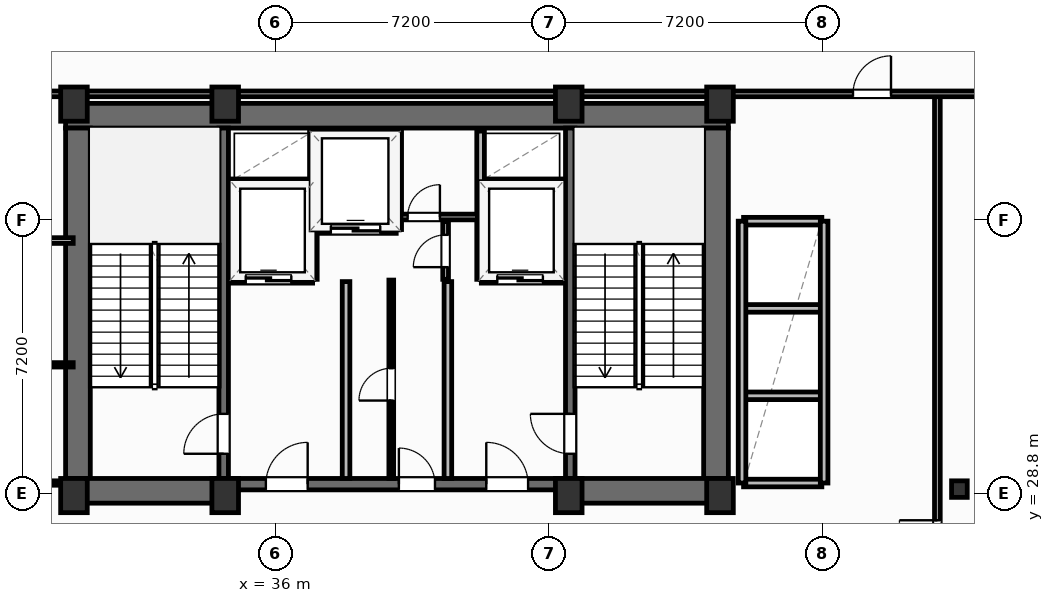
"""IFC4 building model, lengths in metres.
Left out: names, types, materials, properties, quantities, classifications, styles, units other than length and angle.
Written with IfcOpenShell. Run it as: python <this file> out.ifc"""

import sys

from ifc_helpers import new_model, si_unit, direction, frame, frame_2d, origin, origin_2d, place, context, subcontext, project, spatial, rectangle, i_section, extrude, element, fill, save


model = new_model("IFC4")
c1 = context("Model", 3, precision=1e-05, world=origin(), true_north=direction((0.0, 1.0)))
c2 = subcontext(c1, "Body", "Model", "MODEL_VIEW")
j1 = project(units=[si_unit("LENGTHUNIT", "METRE"), si_unit("PLANEANGLEUNIT", "RADIAN")], contexts=[c1])
p1 = place(None, origin())
s1 = spatial("IfcSite", under=j1, at=p1, CompositionType="ELEMENT")
p2 = place(p1, origin())
s2 = spatial("IfcBuilding", under=s1, at=p2, CompositionType="ELEMENT")
p3 = place(p2, frame((0.0, 0.0, 207.9)))
s3 = spatial("IfcBuildingStorey", under=s2, at=p3, CompositionType="ELEMENT", Elevation=207.9)
for number, where, z_axis, x_axis in (
    (1, (30.7, 28.75, 0.0), (0.0, 0.0, 1.0), (1.0, 0.0, 0.0)),
    (2, (34.68, 28.75, 0.0), (0.0, 0.0, 1.0), (1.0, 0.0, 0.0)),
    (3, (43.72, 28.75, 0.0), (0.0, 0.0, 1.0), (1.0, 0.0, 0.0)),
    (4, (47.7, 28.75, 0.0), (0.0, 0.0, 1.0), (1.0, 0.0, 0.0)),
    (5, (30.7, 39.05, 0.0), (0.0, 0.0, 1.0), (1.0, 0.0, 0.0)),
    (6, (34.68, 39.05, 0.0), (0.0, 0.0, 1.0), (1.0, 0.0, 0.0)),
    (7, (43.72, 39.05, 0.0), (0.0, 0.0, 1.0), (1.0, 0.0, 0.0)),
    (8, (47.7, 39.05, 0.0), (0.0, 0.0, 1.0), (1.0, 0.0, 0.0)),
):
    element("IfcColumn", number, at=place(p3, frame(where, z_axis=z_axis, x_axis=x_axis)), inside=s3, PredefinedType="COLUMN", context=c2, shape_type="SweptSolid", body=[
        extrude(rectangle(XDim=0.7, YDim=0.9, at=origin_2d()), origin(), (0.0, 0.0, 1.0), 4.8),
    ])
p4 = place(p3, frame((54.0, 28.92, 0.0), z_axis=(0.0, 0.0, 1.0), x_axis=(1.0, 0.0, 0.0)))
e9 = element("IfcColumn", 9, at=p4, inside=s3, PredefinedType="COLUMN", context=c2, shape_type="SweptSolid", body=[
    extrude(i_section(OverallWidth=0.412, OverallDepth=0.435, WebThickness=0.036, FlangeThickness=0.057, FilletRadius=0.025, at=origin_2d()), origin(), (0.0, 0.0, 1.0), 4.8),
])
p5 = place(p3, frame((30.48, 38.745, 0.0), z_axis=(0.0, 0.0, 1.0), x_axis=(1.0, 0.0, 0.0)))
e10 = element("IfcWall", 10, at=p5, inside=s3, PredefinedType="SHEAR", context=c2, shape_type="SweptSolid", body=[
    extrude(rectangle(XDim=17.44, YDim=0.65, at=frame_2d((8.72, 0.0))), origin(), (0.0, 0.0, 1.0), 4.55),
])
for number, where, z_axis, x_axis in (
    (11, (30.805, 29.2, 0.0), (0.0, 0.0, 1.0), (0.0, 1.0, 0.0)),
    (12, (47.595, 29.2, 0.0), (0.0, 0.0, 1.0), (0.0, 1.0, 0.0)),
):
    element("IfcWall", number, at=place(p3, frame(where, z_axis=z_axis, x_axis=x_axis)), inside=s3, PredefinedType="SHEAR", context=c2, shape_type="SweptSolid", body=[
        extrude(rectangle(XDim=9.22, YDim=0.65, at=frame_2d((4.61, 0.0))), origin(), (0.0, 0.0, 1.0), 4.55),
    ])
p6 = place(p3, frame((30.48, 28.875, 0.0), z_axis=(0.0, 0.0, 1.0), x_axis=(1.0, 0.0, 0.0)))
e13 = element("IfcWall", 13, at=p6, inside=s3, PredefinedType="SHEAR", context=c2, shape_type="SweptSolid", body=[
    extrude(rectangle(XDim=4.32, YDim=0.65, at=frame_2d((2.16, 0.0))), origin(), (0.0, 0.0, 1.0), 4.55),
])
p7 = place(p3, frame((43.6, 28.875, 0.0), z_axis=(0.0, 0.0, 1.0), x_axis=(1.0, 0.0, 0.0)))
e14 = element("IfcWall", 14, at=p7, inside=s3, PredefinedType="SHEAR", context=c2, shape_type="SweptSolid", body=[
    extrude(rectangle(XDim=4.32, YDim=0.65, at=frame_2d((2.16, 0.0))), origin(), (0.0, 0.0, 1.0), 4.55),
])
p8 = place(p3, frame((34.8, 29.05, 0.0), z_axis=(0.0, 0.0, 1.0), x_axis=(1.0, 0.0, 0.0)))
e15 = element("IfcWall", 15, at=p8, inside=s3, PredefinedType="SHEAR", context=c2, shape_type="SweptSolid", body=[
    extrude(rectangle(XDim=8.8, YDim=0.3, at=frame_2d((4.4, 0.0))), origin(), (0.0, 0.0, 1.0), 4.55),
])
p9 = place(p8, frame((0.95, 0.0, 0.0)))
e16 = element("IfcOpeningElement", 16, at=p9, cuts=e15, PredefinedType="OPENING", context=c2, shape_type="SweptSolid", body=[
    extrude(rectangle(XDim=1.1, YDim=2.15, at=frame_2d((0.55, 1.075))), frame((0.0, 0.16, 0.0), z_axis=(0.0, -1.0, 0.0), x_axis=(1.0, 0.0, 0.0)), (0.0, 0.0, 1.0), 0.32),
])
p10 = place(p8, frame((6.75, 0.0, 0.0)))
e17 = element("IfcOpeningElement", 17, at=p10, cuts=e15, PredefinedType="OPENING", context=c2, shape_type="SweptSolid", body=[
    extrude(rectangle(XDim=1.1, YDim=2.15, at=frame_2d((0.55, 1.075))), frame((0.0, 0.16, 0.0), z_axis=(0.0, -1.0, 0.0), x_axis=(1.0, 0.0, 0.0)), (0.0, 0.0, 1.0), 0.32),
])
p11 = place(p8, frame((4.45, 0.0, 0.0)))
e18 = element("IfcOpeningElement", 18, at=p11, cuts=e15, PredefinedType="OPENING", context=c2, shape_type="SweptSolid", body=[
    extrude(rectangle(XDim=0.95, YDim=2.15, at=frame_2d((0.475, 1.075))), frame((0.0, 0.16, 0.0), z_axis=(0.0, -1.0, 0.0), x_axis=(1.0, 0.0, 0.0)), (0.0, 0.0, 1.0), 0.32),
])
p12 = place(p3, frame((34.64, 29.2, 0.0), z_axis=(0.0, 0.0, 1.0), x_axis=(0.0, 1.0, 0.0)))
e19 = element("IfcWall", 19, at=p12, inside=s3, PredefinedType="SHEAR", context=c2, shape_type="SweptSolid", body=[
    extrude(rectangle(XDim=9.22, YDim=0.25, at=frame_2d((4.61, 0.0))), origin(), (0.0, 0.0, 1.0), 4.55),
])
p13 = place(p12, frame((0.65, 0.0, 0.0)))
e20 = element("IfcOpeningElement", 20, at=p13, cuts=e19, PredefinedType="OPENING", context=c2, shape_type="SweptSolid", body=[
    extrude(rectangle(XDim=1.05, YDim=2.15, at=frame_2d((0.525, 1.075))), frame((0.0, 0.135, 0.0), z_axis=(0.0, -1.0, 0.0), x_axis=(1.0, 0.0, 0.0)), (0.0, 0.0, 1.0), 0.27),
])
p14 = place(p3, frame((43.76, 29.2, 0.0), z_axis=(0.0, 0.0, 1.0), x_axis=(0.0, 1.0, 0.0)))
e21 = element("IfcWall", 21, at=p14, inside=s3, PredefinedType="SHEAR", context=c2, shape_type="SweptSolid", body=[
    extrude(rectangle(XDim=9.22, YDim=0.25, at=frame_2d((4.61, 0.0))), origin(), (0.0, 0.0, 1.0), 4.55),
])
p15 = place(p14, frame((0.65, 0.0, 0.0)))
e22 = element("IfcOpeningElement", 22, at=p15, cuts=e21, PredefinedType="OPENING", context=c2, shape_type="SweptSolid", body=[
    extrude(rectangle(XDim=1.05, YDim=2.15, at=frame_2d((0.525, 1.075))), frame((0.0, 0.135, 0.0), z_axis=(0.0, -1.0, 0.0), x_axis=(1.0, 0.0, 0.0)), (0.0, 0.0, 1.0), 0.27),
])
p16 = place(p3, frame((8.315, 33.164, 0.0), z_axis=(0.0, 0.0, 1.0), x_axis=(0.935222646765, 0.354060165759, 0.0)))
e23 = element("IfcWall", 23, at=p16, inside=s3, PredefinedType="SOLIDWALL", context=c2, shape_type="SweptSolid", body=[
    extrude(rectangle(XDim=52.2, YDim=0.22, at=frame_2d((26.1, 0.0))), origin(), (0.0, 0.0, 1.0), 3.83),
])
p17 = place(p16, frame((23.64, 0.0, 0.0)))
e24 = element("IfcOpeningElement", 24, at=p17, cuts=e23, PredefinedType="OPENING", context=c2, shape_type="SweptSolid", body=[
    extrude(rectangle(XDim=1.85, YDim=2.3, at=frame_2d((0.925, 1.15))), frame((0.0, 0.12, 0.0), z_axis=(0.0, -1.0, 0.0), x_axis=(1.0, 0.0, 0.0)), (0.0, 0.0, 1.0), 0.24),
])
p18 = place(p16, frame((0.55, 0.0, 0.75)))
e25 = element("IfcOpeningElement", 25, at=p18, cuts=e23, PredefinedType="OPENING", context=c2, shape_type="SweptSolid", body=[
    extrude(rectangle(XDim=1.85, YDim=1.75, at=frame_2d((0.925, 0.875))), frame((0.0, 0.12, 0.0), z_axis=(0.0, -1.0, 0.0), x_axis=(1.0, 0.0, 0.0)), (0.0, 0.0, 1.0), 0.24),
])
p19 = place(p16, frame((49.8, 0.0, 0.75)))
e26 = element("IfcOpeningElement", 26, at=p19, cuts=e23, PredefinedType="OPENING", context=c2, shape_type="SweptSolid", body=[
    extrude(rectangle(XDim=1.85, YDim=1.75, at=frame_2d((0.925, 0.875))), frame((0.0, 0.12, 0.0), z_axis=(0.0, -1.0, 0.0), x_axis=(1.0, 0.0, 0.0)), (0.0, 0.0, 1.0), 0.24),
])
p20 = place(p3, frame((53.42, 19.3, 0.0), z_axis=(0.0, 0.0, 1.0), x_axis=(0.0, 1.0, 0.0)))
e27 = element("IfcWall", 27, at=p20, inside=s3, PredefinedType="PARTITIONING", context=c2, shape_type="SweptSolid", body=[
    extrude(rectangle(XDim=20.02, YDim=0.15, at=frame_2d((10.01, 0.0))), origin(), (0.0, 0.0, 1.0), 4.55),
])
p21 = place(p20, frame((7.8, 0.0, 0.0)))
e28 = element("IfcOpeningElement", 28, at=p21, cuts=e27, PredefinedType="OPENING", context=c2, shape_type="SweptSolid", body=[
    extrude(rectangle(XDim=1.0, YDim=2.05, at=frame_2d((0.5, 1.025))), frame((0.0, 0.085, 0.0), z_axis=(0.0, -1.0, 0.0), x_axis=(1.0, 0.0, 0.0)), (0.0, 0.0, 1.0), 0.17),
])
p22 = place(p3, frame((20.0, 39.32, 0.0), z_axis=(0.0, 0.0, 1.0), x_axis=(1.0, 0.0, 0.0)))
e29 = element("IfcWall", 29, at=p22, inside=s3, PredefinedType="PARTITIONING", context=c2, shape_type="SweptSolid", body=[
    extrude(rectangle(XDim=40.0, YDim=0.15, at=frame_2d((20.0, 0.0))), origin(), (0.0, 0.0, 1.0), 4.55),
])
p23 = place(p22, frame((31.2, 0.0, 0.0)))
e30 = element("IfcOpeningElement", 30, at=p23, cuts=e29, PredefinedType="OPENING", context=c2, shape_type="SweptSolid", body=[
    extrude(rectangle(XDim=1.0, YDim=2.05, at=frame_2d((0.5, 1.025))), frame((0.0, 0.085, 0.0), z_axis=(0.0, -1.0, 0.0), x_axis=(1.0, 0.0, 0.0)), (0.0, 0.0, 1.0), 0.17),
])
for number, where, z_axis, x_axis in (
    (31, (37.86, 29.2, 0.0), (0.0, 0.0, 1.0), (0.0, 1.0, 0.0)),
    (32, (40.54, 29.2, 0.0), (0.0, 0.0, 1.0), (0.0, 1.0, 0.0)),
):
    element("IfcWall", number, at=place(p3, frame(where, z_axis=z_axis, x_axis=x_axis)), inside=s3, PredefinedType="PARTITIONING", context=c2, shape_type="SweptSolid", body=[
        extrude(rectangle(XDim=5.18, YDim=0.2, at=frame_2d((2.59, 0.0))), origin(), (0.0, 0.0, 1.0), 4.55),
    ])
p24 = place(p3, frame((34.8, 34.44, 0.0), z_axis=(0.0, 0.0, 1.0), x_axis=(1.0, 0.0, 0.0)))
e33 = element("IfcWall", 33, at=p24, inside=s3, PredefinedType="PARTITIONING", context=c2, shape_type="SweptSolid", body=[
    extrude(rectangle(XDim=2.18, YDim=0.2, at=frame_2d((1.09, 0.0))), origin(), (0.0, 0.0, 1.0), 4.55),
])
p25 = place(p24, frame((0.42, 0.0, 0.0)))
e34 = element("IfcOpeningElement", 34, at=p25, cuts=e33, PredefinedType="OPENING", context=c2, shape_type="SweptSolid", body=[
    extrude(rectangle(XDim=1.2, YDim=2.2, at=frame_2d((0.6, 1.1))), frame((0.0, 0.11, 0.0), z_axis=(0.0, -1.0, 0.0), x_axis=(1.0, 0.0, 0.0)), (0.0, 0.0, 1.0), 0.22),
])
p26 = place(p3, frame((34.8, 36.98, 0.0), z_axis=(0.0, 0.0, 1.0), x_axis=(1.0, 0.0, 0.0)))
e35 = element("IfcWall", 35, at=p26, inside=s3, PredefinedType="PARTITIONING", context=c2, shape_type="SweptSolid", body=[
    extrude(rectangle(XDim=2.18, YDim=0.2, at=frame_2d((1.09, 0.0))), origin(), (0.0, 0.0, 1.0), 4.55),
])
p27 = place(p3, frame((37.0, 34.44, 0.0), z_axis=(0.0, 0.0, 1.0), x_axis=(0.0, 1.0, 0.0)))
e36 = element("IfcWall", 36, at=p27, inside=s3, PredefinedType="PARTITIONING", context=c2, shape_type="SweptSolid", body=[
    extrude(rectangle(XDim=3.9, YDim=0.2, at=frame_2d((1.95, 0.0))), origin(), (0.0, 0.0, 1.0), 4.55),
])
p28 = place(p3, frame((41.42, 34.44, 0.0), z_axis=(0.0, 0.0, 1.0), x_axis=(1.0, 0.0, 0.0)))
e37 = element("IfcWall", 37, at=p28, inside=s3, PredefinedType="PARTITIONING", context=c2, shape_type="SweptSolid", body=[
    extrude(rectangle(XDim=2.18, YDim=0.2, at=frame_2d((1.09, 0.0))), origin(), (0.0, 0.0, 1.0), 4.55),
])
p29 = place(p28, frame((0.42, 0.0, 0.0)))
e38 = element("IfcOpeningElement", 38, at=p29, cuts=e37, PredefinedType="OPENING", context=c2, shape_type="SweptSolid", body=[
    extrude(rectangle(XDim=1.2, YDim=2.2, at=frame_2d((0.6, 1.1))), frame((0.0, 0.11, 0.0), z_axis=(0.0, -1.0, 0.0), x_axis=(1.0, 0.0, 0.0)), (0.0, 0.0, 1.0), 0.22),
])
p30 = place(p3, frame((41.42, 36.98, 0.0), z_axis=(0.0, 0.0, 1.0), x_axis=(1.0, 0.0, 0.0)))
e39 = element("IfcWall", 39, at=p30, inside=s3, PredefinedType="PARTITIONING", context=c2, shape_type="SweptSolid", body=[
    extrude(rectangle(XDim=2.18, YDim=0.2, at=frame_2d((1.09, 0.0))), origin(), (0.0, 0.0, 1.0), 4.55),
])
p31 = place(p3, frame((41.4, 34.44, 0.0), z_axis=(0.0, 0.0, 1.0), x_axis=(0.0, 1.0, 0.0)))
e40 = element("IfcWall", 40, at=p31, inside=s3, PredefinedType="PARTITIONING", context=c2, shape_type="SweptSolid", body=[
    extrude(rectangle(XDim=3.9, YDim=0.2, at=frame_2d((1.95, 0.0))), origin(), (0.0, 0.0, 1.0), 4.55),
])
p32 = place(p3, frame((37.06, 35.75, 0.0), z_axis=(0.0, 0.0, 1.0), x_axis=(1.0, 0.0, 0.0)))
e41 = element("IfcWall", 41, at=p32, inside=s3, PredefinedType="PARTITIONING", context=c2, shape_type="SweptSolid", body=[
    extrude(rectangle(XDim=2.12, YDim=0.2, at=frame_2d((1.06, 0.0))), origin(), (0.0, 0.0, 1.0), 4.55),
])
p33 = place(p32, frame((0.4, 0.0, 0.0)))
e42 = element("IfcOpeningElement", 42, at=p33, cuts=e41, PredefinedType="OPENING", context=c2, shape_type="SweptSolid", body=[
    extrude(rectangle(XDim=1.3, YDim=2.2, at=frame_2d((0.65, 1.1))), frame((0.0, 0.11, 0.0), z_axis=(0.0, -1.0, 0.0), x_axis=(1.0, 0.0, 0.0)), (0.0, 0.0, 1.0), 0.22),
])
p34 = place(p3, frame((39.22, 35.75, 0.0), z_axis=(0.0, 0.0, 1.0), x_axis=(0.0, 1.0, 0.0)))
e43 = element("IfcWall", 43, at=p34, inside=s3, PredefinedType="PARTITIONING", context=c2, shape_type="SweptSolid", body=[
    extrude(rectangle(XDim=2.59, YDim=0.2, at=frame_2d((1.295, 0.0))), origin(), (0.0, 0.0, 1.0), 4.55),
])
p35 = place(p3, frame((39.3, 36.08, 0.0), z_axis=(0.0, 0.0, 1.0), x_axis=(1.0, 0.0, 0.0)))
e44 = element("IfcWall", 44, at=p35, inside=s3, PredefinedType="PARTITIONING", context=c2, shape_type="SweptSolid", body=[
    extrude(rectangle(XDim=2.02, YDim=0.15, at=frame_2d((1.01, 0.0))), origin(), (0.0, 0.0, 1.0), 4.55),
])
p36 = place(p35, frame((0.18, 0.0, 0.0)))
e45 = element("IfcOpeningElement", 45, at=p36, cuts=e44, PredefinedType="OPENING", context=c2, shape_type="SweptSolid", body=[
    extrude(rectangle(XDim=0.85, YDim=2.05, at=frame_2d((0.425, 1.025))), frame((0.0, 0.085, 0.0), z_axis=(0.0, -1.0, 0.0), x_axis=(1.0, 0.0, 0.0)), (0.0, 0.0, 1.0), 0.17),
])
p37 = place(p3, frame((40.48, 34.44, 0.0), z_axis=(0.0, 0.0, 1.0), x_axis=(0.0, 1.0, 0.0)))
e46 = element("IfcWall", 46, at=p37, inside=s3, PredefinedType="PARTITIONING", context=c2, shape_type="SweptSolid", body=[
    extrude(rectangle(XDim=1.52, YDim=0.15, at=frame_2d((0.76, 0.0))), origin(), (0.0, 0.0, 1.0), 4.55),
])
p38 = place(p37, frame((0.32, 0.0, 0.0)))
e47 = element("IfcOpeningElement", 47, at=p38, cuts=e46, PredefinedType="OPENING", context=c2, shape_type="SweptSolid", body=[
    extrude(rectangle(XDim=0.85, YDim=2.05, at=frame_2d((0.425, 1.025))), frame((0.0, 0.085, 0.0), z_axis=(0.0, -1.0, 0.0), x_axis=(1.0, 0.0, 0.0)), (0.0, 0.0, 1.0), 0.17),
])
p39 = place(p3, frame((39.05, 29.2, 0.0), z_axis=(0.0, 0.0, 1.0), x_axis=(0.0, 1.0, 0.0)))
e48 = element("IfcWall", 48, at=p39, inside=s3, PredefinedType="PARTITIONING", context=c2, shape_type="SweptSolid", body=[
    extrude(rectangle(XDim=5.22, YDim=0.125, at=frame_2d((2.61, 0.0))), origin(), (0.0, 0.0, 1.0), 4.55),
])
p40 = place(p39, frame((2.05, 0.0, 0.0)))
e49 = element("IfcOpeningElement", 49, at=p40, cuts=e48, PredefinedType="OPENING", context=c2, shape_type="SweptSolid", body=[
    extrude(rectangle(XDim=0.85, YDim=2.05, at=frame_2d((0.425, 1.025))), frame((0.0, 0.073, 0.0), z_axis=(0.0, -1.0, 0.0), x_axis=(1.0, 0.0, 0.0)), (0.0, 0.0, 1.0), 0.145),
])
p41 = place(p3, frame((26.8, 32.19, 0.0), z_axis=(0.0, 0.0, 1.0), x_axis=(1.0, 0.0, 0.0)))
e50 = element("IfcWall", 50, at=p41, inside=s3, PredefinedType="PARTITIONING", context=c2, shape_type="SweptSolid", body=[
    extrude(rectangle(XDim=3.88, YDim=0.115, at=frame_2d((1.94, 0.0))), origin(), (0.0, 0.0, 1.0), 4.55),
])
p42 = place(p3, frame((26.78, 29.08, 0.0), z_axis=(0.0, 0.0, 1.0), x_axis=(1.0, 0.0, 0.0)))
e51 = element("IfcWall", 51, at=p42, inside=s3, PredefinedType="PARTITIONING", context=c2, shape_type="SweptSolid", body=[
    extrude(rectangle(XDim=3.7, YDim=0.115, at=frame_2d((1.85, 0.0))), origin(), (0.0, 0.0, 1.0), 4.55),
])
p43 = place(p3, frame((26.78, 35.46, 0.0), z_axis=(0.0, 0.0, 1.0), x_axis=(1.0, 0.0, 0.0)))
e52 = element("IfcWall", 52, at=p43, inside=s3, PredefinedType="PARTITIONING", context=c2, shape_type="SweptSolid", body=[
    extrude(rectangle(XDim=3.9, YDim=0.15, at=frame_2d((1.95, 0.0))), origin(), (0.0, 0.0, 1.0), 4.55),
])
for number, where, z_axis, x_axis in (
    (53, (48.32, 31.375, 0.0), (0.0, 0.0, 1.0), (1.0, 0.0, 0.0)),
    (54, (48.32, 33.675, 0.0), (0.0, 0.0, 1.0), (1.0, 0.0, 0.0)),
):
    element("IfcWall", number, at=place(p3, frame(where, z_axis=z_axis, x_axis=x_axis)), inside=s3, PredefinedType="PARTITIONING", context=c2, shape_type="SweptSolid", body=[
        extrude(rectangle(XDim=2.06, YDim=0.2, at=frame_2d((1.03, 0.0))), origin(), (0.0, 0.0, 1.0), 4.55),
    ])
p44 = place(p3, frame((48.32, 29.08, 0.0), z_axis=(0.0, 0.0, 1.0), x_axis=(1.0, 0.0, 0.0)))
e55 = element("IfcWall", 55, at=p44, inside=s3, PredefinedType="PARTITIONING", context=c2, shape_type="SweptSolid", body=[
    extrude(rectangle(XDim=2.06, YDim=0.2, at=frame_2d((1.03, 0.0))), origin(), (0.0, 0.0, 1.0), 3.762),
])
p45 = place(p3, frame((48.32, 35.97, 0.0), z_axis=(0.0, 0.0, 1.0), x_axis=(1.0, 0.0, 0.0)))
e56 = element("IfcWall", 56, at=p45, inside=s3, PredefinedType="PARTITIONING", context=c2, shape_type="SweptSolid", body=[
    extrude(rectangle(XDim=2.06, YDim=0.2, at=frame_2d((1.03, 0.0))), origin(), (0.0, 0.0, 1.0), 4.55),
])
for number, where, z_axis, x_axis in (
    (57, (48.28, 29.08, 0.0), (0.0, 0.0, 1.0), (0.0, 1.0, 0.0)),
    (58, (50.44, 29.08, 0.0), (0.0, 0.0, 1.0), (0.0, 1.0, 0.0)),
):
    element("IfcWall", number, at=place(p3, frame(where, z_axis=z_axis, x_axis=x_axis)), inside=s3, PredefinedType="PARTITIONING", context=c2, shape_type="SweptSolid", body=[
        extrude(rectangle(XDim=6.89, YDim=0.2, at=frame_2d((3.445, 0.0))), origin(), (0.0, 0.0, 1.0), 4.55),
    ])
p46 = place(p21, origin())
e59 = element("IfcDoor", 59, at=p46, inside=s3, OperationType="SINGLE_SWING_RIGHT", PredefinedType="DOOR", context=c2, shape_type="SweptSolid", body=[
    extrude(rectangle(XDim=1.0, YDim=2.05, at=frame_2d((0.5, 1.025))), frame((0.0, 0.025, 0.0), z_axis=(0.0, -1.0, 0.0), x_axis=(1.0, 0.0, 0.0)), (0.0, 0.0, 1.0), 0.05),
])
fill(e28, e59)
p47 = place(p23, origin())
e60 = element("IfcDoor", 60, at=p47, inside=s3, OperationType="SINGLE_SWING_RIGHT", PredefinedType="DOOR", context=c2, shape_type="SweptSolid", body=[
    extrude(rectangle(XDim=1.0, YDim=2.05, at=frame_2d((0.5, 1.025))), frame((0.0, 0.025, 0.0), z_axis=(0.0, -1.0, 0.0), x_axis=(1.0, 0.0, 0.0)), (0.0, 0.0, 1.0), 0.05),
])
fill(e30, e60)
p48 = place(p13, origin())
e61 = element("IfcDoor", 61, at=p48, inside=s3, OperationType="SINGLE_SWING_LEFT", PredefinedType="DOOR", context=c2, shape_type="SweptSolid", body=[
    extrude(rectangle(XDim=1.05, YDim=2.15, at=frame_2d((0.525, 1.075))), frame((0.0, 0.025, 0.0), z_axis=(0.0, -1.0, 0.0), x_axis=(1.0, 0.0, 0.0)), (0.0, 0.0, 1.0), 0.05),
])
fill(e20, e61)
p49 = place(p15, origin())
e62 = element("IfcDoor", 62, at=p49, inside=s3, OperationType="SINGLE_SWING_RIGHT", PredefinedType="DOOR", context=c2, shape_type="SweptSolid", body=[
    extrude(rectangle(XDim=1.05, YDim=2.15, at=frame_2d((0.525, 1.075))), frame((0.0, 0.025, 0.0), z_axis=(0.0, -1.0, 0.0), x_axis=(1.0, 0.0, 0.0)), (0.0, 0.0, 1.0), 0.05),
])
fill(e22, e62)
p50 = place(p9, origin())
e63 = element("IfcDoor", 63, at=p50, inside=s3, OperationType="SINGLE_SWING_RIGHT", PredefinedType="DOOR", context=c2, shape_type="SweptSolid", body=[
    extrude(rectangle(XDim=1.1, YDim=2.15, at=frame_2d((0.55, 1.075))), frame((0.0, 0.025, 0.0), z_axis=(0.0, -1.0, 0.0), x_axis=(1.0, 0.0, 0.0)), (0.0, 0.0, 1.0), 0.05),
])
fill(e16, e63)
p51 = place(p10, origin())
e64 = element("IfcDoor", 64, at=p51, inside=s3, OperationType="SINGLE_SWING_LEFT", PredefinedType="DOOR", context=c2, shape_type="SweptSolid", body=[
    extrude(rectangle(XDim=1.1, YDim=2.15, at=frame_2d((0.55, 1.075))), frame((0.0, 0.025, 0.0), z_axis=(0.0, -1.0, 0.0), x_axis=(1.0, 0.0, 0.0)), (0.0, 0.0, 1.0), 0.05),
])
fill(e17, e64)
p52 = place(p25, origin())
e65 = element("IfcDoor", 65, at=p52, inside=s3, OperationType="SLIDING_TO_LEFT", PredefinedType="DOOR", context=c2, shape_type="SweptSolid", body=[
    extrude(rectangle(XDim=1.2, YDim=2.2, at=frame_2d((0.6, 1.1))), frame((0.0, 0.025, 0.0), z_axis=(0.0, -1.0, 0.0), x_axis=(1.0, 0.0, 0.0)), (0.0, 0.0, 1.0), 0.05),
])
fill(e34, e65)
p53 = place(p29, origin())
e66 = element("IfcDoor", 66, at=p53, inside=s3, OperationType="SLIDING_TO_LEFT", PredefinedType="DOOR", context=c2, shape_type="SweptSolid", body=[
    extrude(rectangle(XDim=1.2, YDim=2.2, at=frame_2d((0.6, 1.1))), frame((0.0, 0.025, 0.0), z_axis=(0.0, -1.0, 0.0), x_axis=(1.0, 0.0, 0.0)), (0.0, 0.0, 1.0), 0.05),
])
fill(e38, e66)
p54 = place(p33, origin())
e67 = element("IfcDoor", 67, at=p54, inside=s3, OperationType="SLIDING_TO_LEFT", PredefinedType="DOOR", context=c2, shape_type="SweptSolid", body=[
    extrude(rectangle(XDim=1.3, YDim=2.2, at=frame_2d((0.65, 1.1))), frame((0.0, 0.025, 0.0), z_axis=(0.0, -1.0, 0.0), x_axis=(1.0, 0.0, 0.0)), (0.0, 0.0, 1.0), 0.05),
])
fill(e42, e67)
p55 = place(p36, origin())
e68 = element("IfcDoor", 68, at=p55, inside=s3, OperationType="SINGLE_SWING_RIGHT", PredefinedType="DOOR", context=c2, shape_type="SweptSolid", body=[
    extrude(rectangle(XDim=0.85, YDim=2.05, at=frame_2d((0.425, 1.025))), frame((0.0, 0.025, 0.0), z_axis=(0.0, -1.0, 0.0), x_axis=(1.0, 0.0, 0.0)), (0.0, 0.0, 1.0), 0.05),
])
fill(e45, e68)
p56 = place(p38, origin())
e69 = element("IfcDoor", 69, at=p56, inside=s3, OperationType="SINGLE_SWING_LEFT", PredefinedType="DOOR", context=c2, shape_type="SweptSolid", body=[
    extrude(rectangle(XDim=0.85, YDim=2.05, at=frame_2d((0.425, 1.025))), frame((0.0, 0.025, 0.0), z_axis=(0.0, -1.0, 0.0), x_axis=(1.0, 0.0, 0.0)), (0.0, 0.0, 1.0), 0.05),
])
fill(e47, e69)
p57 = place(p40, origin())
e70 = element("IfcDoor", 70, at=p57, inside=s3, OperationType="SINGLE_SWING_LEFT", PredefinedType="DOOR", context=c2, shape_type="SweptSolid", body=[
    extrude(rectangle(XDim=0.85, YDim=2.05, at=frame_2d((0.425, 1.025))), frame((0.0, 0.025, 0.0), z_axis=(0.0, -1.0, 0.0), x_axis=(1.0, 0.0, 0.0)), (0.0, 0.0, 1.0), 0.05),
])
fill(e49, e70)
p58 = place(p11, origin())
e71 = element("IfcDoor", 71, at=p58, inside=s3, OperationType="SINGLE_SWING_LEFT", PredefinedType="DOOR", context=c2, shape_type="SweptSolid", body=[
    extrude(rectangle(XDim=0.95, YDim=2.15, at=frame_2d((0.475, 1.075))), frame((0.0, 0.025, 0.0), z_axis=(0.0, -1.0, 0.0), x_axis=(1.0, 0.0, 0.0)), (0.0, 0.0, 1.0), 0.05),
])
fill(e18, e71)
save(model, sys.argv[1])
